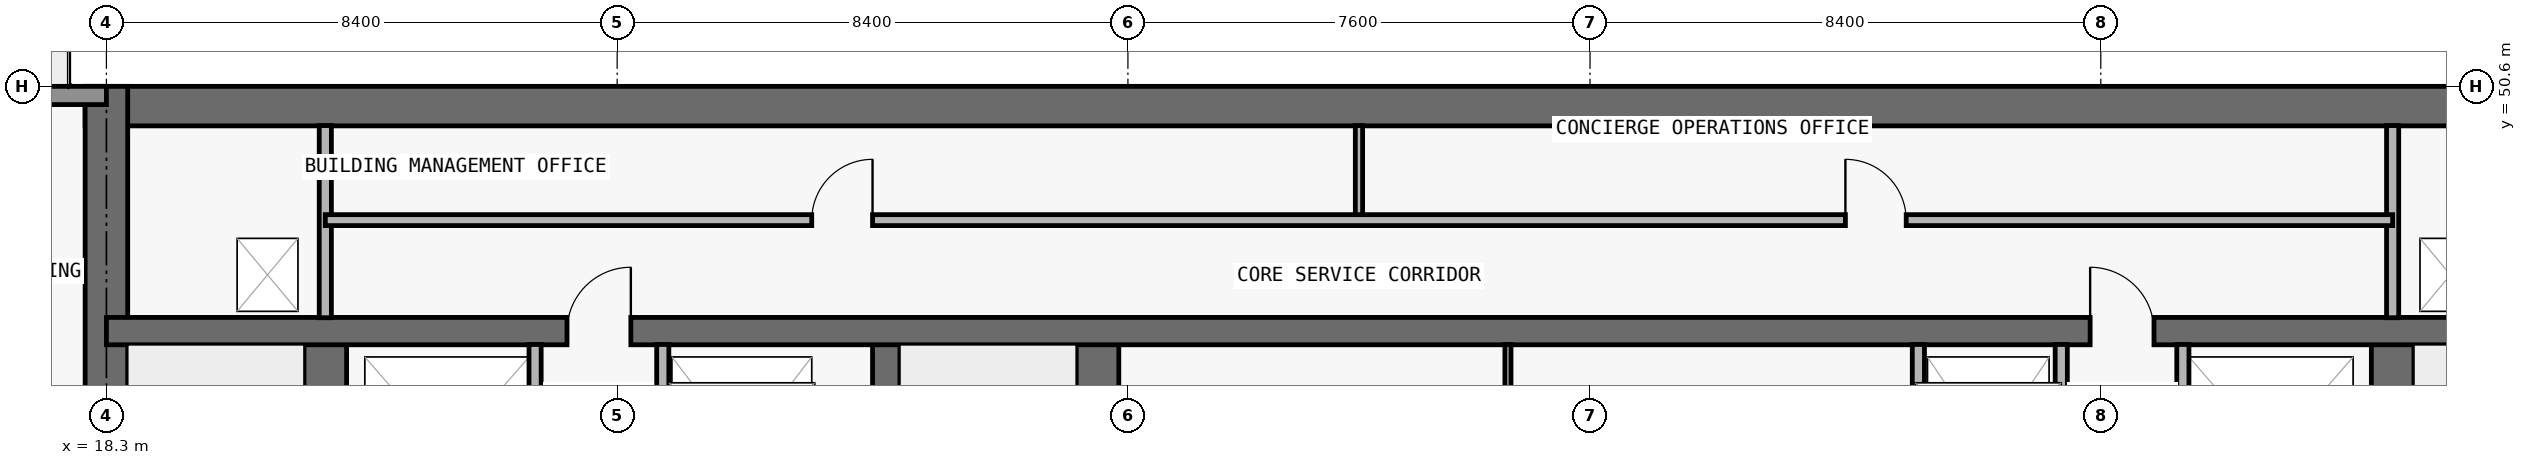
"""IFC4 building model, lengths in metres.
Left out: names, types, materials, properties, quantities, classifications, styles, units other than length and angle.
Written with IfcOpenShell. Run it as: python <this file> out.ifc"""

import sys

from ifc_helpers import new_model, si_unit, direction, frame, frame_2d, origin, place, context, subcontext, project, spatial, rectangle, extrude, element, fill, save


model = new_model("IFC4")
c1 = context("Model", 3, precision=1e-05, world=origin(), true_north=direction((0.0, 1.0)))
c2 = subcontext(c1, "Body", "Model", "MODEL_VIEW")
j1 = project(units=[si_unit("LENGTHUNIT", "METRE"), si_unit("PLANEANGLEUNIT", "RADIAN")], contexts=[c1])
p1 = place(None, origin())
s1 = spatial("IfcSite", under=j1, at=p1, CompositionType="ELEMENT")
p2 = place(p1, origin())
s2 = spatial("IfcBuilding", under=s1, at=p2, CompositionType="ELEMENT")
p3 = place(p2, frame((0.0, 0.0, 236.4)))
s3 = spatial("IfcBuildingStorey", under=s2, at=p3, CompositionType="ELEMENT", Elevation=236.4)
p4 = place(p3, frame((17.95, 50.275, 0.0), z_axis=(0.0, 0.0, 1.0), x_axis=(1.0, 0.0, 0.0)))
e1 = element("IfcWall", 1, at=p4, inside=s3, PredefinedType="SHEAR", context=c2, shape_type="SweptSolid", body=[
    extrude(rectangle(XDim=41.9, YDim=0.65, at=frame_2d((20.95, 0.0))), origin(), (0.0, 0.0, 1.0), 3.05),
])
p5 = place(p3, frame((18.3, 36.65, 0.0), z_axis=(0.0, 0.0, 1.0), x_axis=(0.0, 1.0, 0.0)))
e2 = element("IfcWall", 2, at=p5, inside=s3, PredefinedType="SHEAR", context=c2, shape_type="SweptSolid", body=[
    extrude(rectangle(XDim=13.95, YDim=0.7, at=frame_2d((6.975, 0.0))), origin(), (0.0, 0.0, 1.0), 3.05),
])
p6 = place(p3, frame((21.9, 37.0, 0.0), z_axis=(0.0, 0.0, 1.0), x_axis=(0.0, 1.0, 0.0)))
e3 = element("IfcWall", 3, at=p6, inside=s3, PredefinedType="SHEAR", context=c2, shape_type="SweptSolid", body=[
    extrude(rectangle(XDim=9.575, YDim=0.7, at=frame_2d((4.788, 0.0))), origin(), (0.0, 0.0, 1.0), 3.05),
])
p7 = place(p6, frame((0.55, 0.0, 0.0)))
e4 = element("IfcOpeningElement", 4, at=p7, cuts=e3, PredefinedType="OPENING", context=c2, shape_type="SweptSolid", body=[
    extrude(rectangle(XDim=1.1, YDim=2.15, at=frame_2d((0.55, 1.075))), frame((0.0, 0.36, 0.0), z_axis=(0.0, -1.0, 0.0), x_axis=(1.0, 0.0, 0.0)), (0.0, 0.0, 1.0), 0.72),
])
p8 = place(p3, frame((55.9, 37.0, 0.0), z_axis=(0.0, 0.0, 1.0), x_axis=(0.0, 1.0, 0.0)))
e5 = element("IfcWall", 5, at=p8, inside=s3, PredefinedType="SHEAR", context=c2, shape_type="SweptSolid", body=[
    extrude(rectangle(XDim=9.575, YDim=0.7, at=frame_2d((4.788, 0.0))), origin(), (0.0, 0.0, 1.0), 3.05),
])
p9 = place(p8, frame((0.55, 0.0, 0.0)))
e6 = element("IfcOpeningElement", 6, at=p9, cuts=e5, PredefinedType="OPENING", context=c2, shape_type="SweptSolid", body=[
    extrude(rectangle(XDim=1.1, YDim=2.15, at=frame_2d((0.55, 1.075))), frame((0.0, 0.36, 0.0), z_axis=(0.0, -1.0, 0.0), x_axis=(1.0, 0.0, 0.0)), (0.0, 0.0, 1.0), 0.72),
])
p10 = place(p3, frame((31.125, 37.0, 0.0), z_axis=(0.0, 0.0, 1.0), x_axis=(0.0, 1.0, 0.0)))
e7 = element("IfcWall", 7, at=p10, inside=s3, PredefinedType="SHEAR", context=c2, shape_type="SweptSolid", body=[
    extrude(rectangle(XDim=9.575, YDim=0.45, at=frame_2d((4.788, 0.0))), origin(), (0.0, 0.0, 1.0), 3.05),
])
p11 = place(p3, frame((34.6, 37.0, 0.0), z_axis=(0.0, 0.0, 1.0), x_axis=(0.0, 1.0, 0.0)))
e8 = element("IfcWall", 8, at=p11, inside=s3, PredefinedType="SHEAR", context=c2, shape_type="SweptSolid", body=[
    extrude(rectangle(XDim=9.575, YDim=0.7, at=frame_2d((4.788, 0.0))), origin(), (0.0, 0.0, 1.0), 3.05),
])
p12 = place(p3, frame((18.3, 46.575, 0.0), z_axis=(0.0, 0.0, 1.0), x_axis=(1.0, 0.0, 0.0)))
e9 = element("IfcWall", 9, at=p12, inside=s3, PredefinedType="SHEAR", context=c2, shape_type="SweptSolid", body=[
    extrude(rectangle(XDim=41.2, YDim=0.45, at=frame_2d((20.6, 0.0))), origin(), (0.0, 0.0, 1.0), 3.05),
])
p13 = place(p12, frame((7.575, 0.0, 0.0)))
e10 = element("IfcOpeningElement", 10, at=p13, cuts=e9, PredefinedType="OPENING", context=c2, shape_type="SweptSolid", body=[
    extrude(rectangle(XDim=1.05, YDim=2.15, at=frame_2d((0.525, 1.075))), frame((0.0, 0.235, 0.0), z_axis=(0.0, -1.0, 0.0), x_axis=(1.0, 0.0, 0.0)), (0.0, 0.0, 1.0), 0.47),
])
p14 = place(p12, frame((32.625, 0.0, 0.0)))
e11 = element("IfcOpeningElement", 11, at=p14, cuts=e9, PredefinedType="OPENING", context=c2, shape_type="SweptSolid", body=[
    extrude(rectangle(XDim=1.05, YDim=2.15, at=frame_2d((0.525, 1.075))), frame((0.0, 0.235, 0.0), z_axis=(0.0, -1.0, 0.0), x_axis=(1.0, 0.0, 0.0)), (0.0, 0.0, 1.0), 0.47),
])
p15 = place(p3, frame((12.1, 50.45, 0.0), z_axis=(0.0, 0.0, 1.0), x_axis=(1.0, 0.0, 0.0)))
e12 = element("IfcWall", 12, at=p15, inside=s3, PredefinedType="STANDARD", context=c2, shape_type="SweptSolid", body=[
    extrude(rectangle(XDim=6.2, YDim=0.3, at=frame_2d((3.1, 0.0))), origin(), (0.0, 0.0, 1.0), 3.05),
])
p16 = place(p15, frame((2.1, 0.0, 0.0)))
e13 = element("IfcOpeningElement", 13, at=p16, cuts=e12, PredefinedType="OPENING", context=c2, shape_type="SweptSolid", body=[
    extrude(rectangle(XDim=2.0, YDim=2.3, at=frame_2d((1.0, 1.15))), frame((0.0, 0.16, 0.0), z_axis=(0.0, -1.0, 0.0), x_axis=(1.0, 0.0, 0.0)), (0.0, 0.0, 1.0), 0.32),
])
p17 = place(p3, frame((21.9, 46.795, 0.0), z_axis=(0.0, 0.0, 1.0), x_axis=(0.0, 1.0, 0.0)))
e14 = element("IfcWall", 14, at=p17, inside=s3, PredefinedType="PARTITIONING", context=c2, shape_type="SweptSolid", body=[
    extrude(rectangle(XDim=3.16, YDim=0.2, at=frame_2d((1.58, 0.0))), origin(), (0.0, 0.0, 1.0), 3.05),
])
for number, where, z_axis, x_axis in (
    (15, (25.35, 43.17, 0.0), (0.0, 0.0, 1.0), (0.0, 1.0, 0.0)),
    (16, (27.45, 43.17, 0.0), (0.0, 0.0, 1.0), (0.0, 1.0, 0.0)),
):
    element("IfcWall", number, at=place(p3, frame(where, z_axis=z_axis, x_axis=x_axis)), inside=s3, PredefinedType="PARTITIONING", context=c2, shape_type="SweptSolid", body=[
        extrude(rectangle(XDim=3.185, YDim=0.2, at=frame_2d((1.593, 0.0))), origin(), (0.0, 0.0, 1.0), 3.05),
    ])
p18 = place(p3, frame((38.9, 48.4, 0.0), z_axis=(0.0, 0.0, 1.0), x_axis=(0.0, 1.0, 0.0)))
e17 = element("IfcWall", 17, at=p18, inside=s3, PredefinedType="PARTITIONING", context=c2, shape_type="SweptSolid", body=[
    extrude(rectangle(XDim=1.555, YDim=0.12, at=frame_2d((0.778, 0.0))), origin(), (0.0, 0.0, 1.0), 3.05),
])
p19 = place(p3, frame((41.35, 43.17, 0.0), z_axis=(0.0, 0.0, 1.0), x_axis=(0.0, 1.0, 0.0)))
e18 = element("IfcWall", 18, at=p19, inside=s3, PredefinedType="MOVABLE", context=c2, shape_type="SweptSolid", body=[
    extrude(rectangle(XDim=3.185, YDim=0.1, at=frame_2d((1.593, 0.0))), origin(), (0.0, 0.0, 1.0), 3.05),
])
for number, where, z_axis, x_axis in (
    (19, (48.1, 43.17, 0.0), (0.0, 0.0, 1.0), (0.0, 1.0, 0.0)),
    (20, (50.45, 43.17, 0.0), (0.0, 0.0, 1.0), (0.0, 1.0, 0.0)),
    (21, (52.45, 43.17, 0.0), (0.0, 0.0, 1.0), (0.0, 1.0, 0.0)),
):
    element("IfcWall", number, at=place(p3, frame(where, z_axis=z_axis, x_axis=x_axis)), inside=s3, PredefinedType="PARTITIONING", context=c2, shape_type="SweptSolid", body=[
        extrude(rectangle(XDim=3.185, YDim=0.2, at=frame_2d((1.593, 0.0))), origin(), (0.0, 0.0, 1.0), 3.05),
    ])
p20 = place(p3, frame((55.9, 46.795, 0.0), z_axis=(0.0, 0.0, 1.0), x_axis=(0.0, 1.0, 0.0)))
e22 = element("IfcWall", 22, at=p20, inside=s3, PredefinedType="PARTITIONING", context=c2, shape_type="SweptSolid", body=[
    extrude(rectangle(XDim=3.16, YDim=0.2, at=frame_2d((1.58, 0.0))), origin(), (0.0, 0.0, 1.0), 3.05),
])
p21 = place(p3, frame((21.9, 48.4, 0.0), z_axis=(0.0, 0.0, 1.0), x_axis=(1.0, 0.0, 0.0)))
e23 = element("IfcWall", 23, at=p21, inside=s3, PredefinedType="PARTITIONING", context=c2, shape_type="SweptSolid", body=[
    extrude(rectangle(XDim=34.0, YDim=0.18, at=frame_2d((17.0, 0.0))), origin(), (0.0, 0.0, 1.0), 3.05),
])
p22 = place(p21, frame((8.0, 0.0, 0.0)))
e24 = element("IfcOpeningElement", 24, at=p22, cuts=e23, PredefinedType="OPENING", context=c2, shape_type="SweptSolid", body=[
    extrude(rectangle(XDim=1.0, YDim=2.2, at=frame_2d((0.5, 1.1))), frame((0.0, 0.1, 0.0), z_axis=(0.0, -1.0, 0.0), x_axis=(1.0, 0.0, 0.0)), (0.0, 0.0, 1.0), 0.2),
])
p23 = place(p21, frame((25.0, 0.0, 0.0)))
e25 = element("IfcOpeningElement", 25, at=p23, cuts=e23, PredefinedType="OPENING", context=c2, shape_type="SweptSolid", body=[
    extrude(rectangle(XDim=1.0, YDim=2.2, at=frame_2d((0.5, 1.1))), frame((0.0, 0.1, 0.0), z_axis=(0.0, -1.0, 0.0), x_axis=(1.0, 0.0, 0.0)), (0.0, 0.0, 1.0), 0.2),
])
p24 = place(p13, origin())
e26 = element("IfcDoor", 26, at=p24, inside=s3, OperationType="SINGLE_SWING_RIGHT", PredefinedType="DOOR", context=c2, shape_type="SweptSolid", body=[
    extrude(rectangle(XDim=1.05, YDim=2.15, at=frame_2d((0.525, 1.075))), frame((0.0, 0.025, 0.0), z_axis=(0.0, -1.0, 0.0), x_axis=(1.0, 0.0, 0.0)), (0.0, 0.0, 1.0), 0.05),
])
fill(e10, e26)
p25 = place(p14, origin())
e27 = element("IfcDoor", 27, at=p25, inside=s3, OperationType="SINGLE_SWING_LEFT", PredefinedType="DOOR", context=c2, shape_type="SweptSolid", body=[
    extrude(rectangle(XDim=1.05, YDim=2.15, at=frame_2d((0.525, 1.075))), frame((0.0, 0.025, 0.0), z_axis=(0.0, -1.0, 0.0), x_axis=(1.0, 0.0, 0.0)), (0.0, 0.0, 1.0), 0.05),
])
fill(e11, e27)
p26 = place(p22, origin())
e28 = element("IfcDoor", 28, at=p26, inside=s3, OperationType="SINGLE_SWING_RIGHT", PredefinedType="DOOR", context=c2, shape_type="SweptSolid", body=[
    extrude(rectangle(XDim=1.0, YDim=2.2, at=frame_2d((0.5, 1.1))), frame((0.0, 0.025, 0.0), z_axis=(0.0, -1.0, 0.0), x_axis=(1.0, 0.0, 0.0)), (0.0, 0.0, 1.0), 0.05),
])
fill(e24, e28)
p27 = place(p23, origin())
e29 = element("IfcDoor", 29, at=p27, inside=s3, OperationType="SINGLE_SWING_LEFT", PredefinedType="DOOR", context=c2, shape_type="SweptSolid", body=[
    extrude(rectangle(XDim=1.0, YDim=2.2, at=frame_2d((0.5, 1.1))), frame((0.0, 0.025, 0.0), z_axis=(0.0, -1.0, 0.0), x_axis=(1.0, 0.0, 0.0)), (0.0, 0.0, 1.0), 0.05),
])
fill(e25, e29)
save(model, sys.argv[1])
